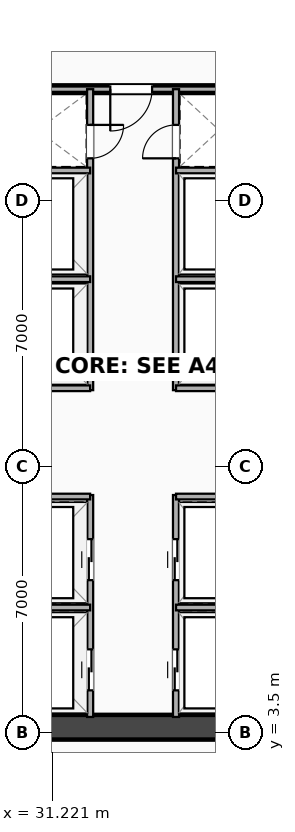
"""IFC4 building model, lengths in metres.
Left out: names, types, materials, properties, quantities, classifications, styles, units other than length and angle.
Written with IfcOpenShell. Run it as: python <this file> out.ifc"""

import sys

from ifc_helpers import new_model, si_unit, direction, frame, frame_2d, origin, place, context, subcontext, project, spatial, rectangle, extrude, element, fill, save


model = new_model("IFC4")
c1 = context("Model", 3, precision=1e-05, world=origin(), true_north=direction((0.0, 1.0)))
c2 = subcontext(c1, "Body", "Model", "MODEL_VIEW")
j1 = project(units=[si_unit("LENGTHUNIT", "METRE"), si_unit("PLANEANGLEUNIT", "RADIAN")], contexts=[c1])
p1 = place(None, origin())
s1 = spatial("IfcSite", under=j1, at=p1, CompositionType="ELEMENT")
p2 = place(p1, origin())
s2 = spatial("IfcBuilding", under=s1, at=p2, CompositionType="ELEMENT")
p3 = place(p2, frame((0.0, 0.0, 5.4)))
s3 = spatial("IfcBuildingStorey", under=s2, at=p3, CompositionType="ELEMENT", Elevation=5.4)
p4 = place(p3, frame((20.3, 3.63, 0.0), z_axis=(0.0, 0.0, 1.0), x_axis=(1.0, 0.0, 0.0)))
e1 = element("IfcWall", 1, at=p4, inside=s3, PredefinedType="SHEAR", context=c2, shape_type="SweptSolid", body=[
    extrude(rectangle(XDim=24.5, YDim=0.65, at=frame_2d((12.25, 0.0))), origin(), (0.0, 0.0, 1.0), 4.3),
])
p5 = place(p3, frame((29.2, 20.42, 0.0), z_axis=(0.0, 0.0, 1.0), x_axis=(1.0, 0.0, 0.0)))
e2 = element("IfcWall", 2, at=p5, inside=s3, PredefinedType="PARTITIONING", context=c2, shape_type="SweptSolid", body=[
    extrude(rectangle(XDim=7.8, YDim=0.2, at=frame_2d((3.9, 0.0))), origin(), (0.0, 0.0, 1.0), 2.635),
])
p6 = place(p5, frame((3.55, 0.0, 0.0)))
e3 = element("IfcOpeningElement", 3, at=p6, cuts=e2, PredefinedType="OPENING", context=c2, shape_type="SweptSolid", body=[
    extrude(rectangle(XDim=1.1, YDim=2.15, at=frame_2d((0.55, 1.075))), frame((0.0, 0.11, 0.0), z_axis=(0.0, -1.0, 0.0), x_axis=(1.0, 0.0, 0.0)), (0.0, 0.0, 1.0), 0.22),
])
p7 = place(p3, frame((32.22, 3.9, 0.0), z_axis=(0.0, 0.0, 1.0), x_axis=(0.0, 1.0, 0.0)))
e4 = element("IfcWall", 4, at=p7, inside=s3, PredefinedType="PARTITIONING", context=c2, shape_type="SweptSolid", body=[
    extrude(rectangle(XDim=5.84, YDim=0.16, at=frame_2d((2.92, 0.0))), origin(), (0.0, 0.0, 1.0), 3.373),
])
p8 = place(p7, frame((1.78, 0.0, 0.0), z_axis=(0.0, 0.0, 1.0), x_axis=(-1.0, 0.0, 0.0)))
e5 = element("IfcOpeningElement", 5, at=p8, cuts=e4, PredefinedType="OPENING", context=c2, shape_type="SweptSolid", body=[
    extrude(rectangle(XDim=1.08, YDim=2.16, at=frame_2d((0.54, 1.08))), frame((0.0, 0.09, 0.0), z_axis=(0.0, -1.0, 0.0), x_axis=(1.0, 0.0, 0.0)), (0.0, 0.0, 1.0), 0.18),
])
p9 = place(p7, frame((4.68, 0.0, 0.0), z_axis=(0.0, 0.0, 1.0), x_axis=(-1.0, 0.0, 0.0)))
e6 = element("IfcOpeningElement", 6, at=p9, cuts=e4, PredefinedType="OPENING", context=c2, shape_type="SweptSolid", body=[
    extrude(rectangle(XDim=1.08, YDim=2.16, at=frame_2d((0.54, 1.08))), frame((0.0, 0.09, 0.0), z_axis=(0.0, -1.0, 0.0), x_axis=(1.0, 0.0, 0.0)), (0.0, 0.0, 1.0), 0.18),
])
p10 = place(p3, frame((34.48, 3.9, 0.0), z_axis=(0.0, 0.0, 1.0), x_axis=(0.0, 1.0, 0.0)))
e7 = element("IfcWall", 7, at=p10, inside=s3, PredefinedType="PARTITIONING", context=c2, shape_type="SweptSolid", body=[
    extrude(rectangle(XDim=5.84, YDim=0.16, at=frame_2d((2.92, 0.0))), origin(), (0.0, 0.0, 1.0), 3.373),
])
p11 = place(p10, frame((0.7, 0.0, 0.0)))
e8 = element("IfcOpeningElement", 8, at=p11, cuts=e7, PredefinedType="OPENING", context=c2, shape_type="SweptSolid", body=[
    extrude(rectangle(XDim=1.08, YDim=2.16, at=frame_2d((0.54, 1.08))), frame((0.0, 0.09, 0.0), z_axis=(0.0, -1.0, 0.0), x_axis=(1.0, 0.0, 0.0)), (0.0, 0.0, 1.0), 0.18),
])
p12 = place(p10, frame((3.6, 0.0, 0.0)))
e9 = element("IfcOpeningElement", 9, at=p12, cuts=e7, PredefinedType="OPENING", context=c2, shape_type="SweptSolid", body=[
    extrude(rectangle(XDim=1.08, YDim=2.16, at=frame_2d((0.54, 1.08))), frame((0.0, 0.09, 0.0), z_axis=(0.0, -1.0, 0.0), x_axis=(1.0, 0.0, 0.0)), (0.0, 0.0, 1.0), 0.18),
])
p13 = place(p3, frame((29.45, 6.78, 0.0), z_axis=(0.0, 0.0, 1.0), x_axis=(1.0, 0.0, 0.0)))
e10 = element("IfcWall", 10, at=p13, inside=s3, PredefinedType="PARTITIONING", context=c2, shape_type="SweptSolid", body=[
    extrude(rectangle(XDim=2.77, YDim=0.15, at=frame_2d((1.385, 0.0))), origin(), (0.0, 0.0, 1.0), 3.43),
])
p14 = place(p3, frame((34.48, 6.78, 0.0), z_axis=(0.0, 0.0, 1.0), x_axis=(1.0, 0.0, 0.0)))
e11 = element("IfcWall", 11, at=p14, inside=s3, PredefinedType="PARTITIONING", context=c2, shape_type="SweptSolid", body=[
    extrude(rectangle(XDim=2.27, YDim=0.15, at=frame_2d((1.135, 0.0))), origin(), (0.0, 0.0, 1.0), 3.43),
])
p15 = place(p3, frame((29.45, 9.7, 0.0), z_axis=(0.0, 0.0, 1.0), x_axis=(1.0, 0.0, 0.0)))
e12 = element("IfcWall", 12, at=p15, inside=s3, PredefinedType="PARTITIONING", context=c2, shape_type="SweptSolid", body=[
    extrude(rectangle(XDim=2.77, YDim=0.15, at=frame_2d((1.385, 0.0))), origin(), (0.0, 0.0, 1.0), 3.43),
])
p16 = place(p3, frame((34.48, 9.7, 0.0), z_axis=(0.0, 0.0, 1.0), x_axis=(1.0, 0.0, 0.0)))
e13 = element("IfcWall", 13, at=p16, inside=s3, PredefinedType="PARTITIONING", context=c2, shape_type="SweptSolid", body=[
    extrude(rectangle(XDim=2.27, YDim=0.15, at=frame_2d((1.135, 0.0))), origin(), (0.0, 0.0, 1.0), 3.43),
])
p17 = place(p3, frame((32.22, 12.5, 0.0), z_axis=(0.0, 0.0, 1.0), x_axis=(0.0, 1.0, 0.0)))
e14 = element("IfcWall", 14, at=p17, inside=s3, PredefinedType="PARTITIONING", context=c2, shape_type="SweptSolid", body=[
    extrude(rectangle(XDim=7.92, YDim=0.16, at=frame_2d((3.96, 0.0))), origin(), (0.0, 0.0, 1.0), 3.373),
])
p18 = place(p17, frame((6.1, 0.0, 0.0)))
e15 = element("IfcOpeningElement", 15, at=p18, cuts=e14, PredefinedType="OPENING", context=c2, shape_type="SweptSolid", body=[
    extrude(rectangle(XDim=0.88, YDim=2.08, at=frame_2d((0.44, 1.04))), frame((0.0, 0.09, 0.0), z_axis=(0.0, -1.0, 0.0), x_axis=(1.0, 0.0, 0.0)), (0.0, 0.0, 1.0), 0.18),
])
p19 = place(p3, frame((34.48, 12.5, 0.0), z_axis=(0.0, 0.0, 1.0), x_axis=(0.0, 1.0, 0.0)))
e16 = element("IfcWall", 16, at=p19, inside=s3, PredefinedType="PARTITIONING", context=c2, shape_type="SweptSolid", body=[
    extrude(rectangle(XDim=7.92, YDim=0.16, at=frame_2d((3.96, 0.0))), origin(), (0.0, 0.0, 1.0), 3.373),
])
p20 = place(p19, frame((6.98, 0.0, 0.0), z_axis=(0.0, 0.0, 1.0), x_axis=(-1.0, 0.0, 0.0)))
e17 = element("IfcOpeningElement", 17, at=p20, cuts=e16, PredefinedType="OPENING", context=c2, shape_type="SweptSolid", body=[
    extrude(rectangle(XDim=0.88, YDim=2.08, at=frame_2d((0.44, 1.04))), frame((0.0, 0.09, 0.0), z_axis=(0.0, -1.0, 0.0), x_axis=(1.0, 0.0, 0.0)), (0.0, 0.0, 1.0), 0.18),
])
p21 = place(p3, frame((29.45, 12.55, 0.0), z_axis=(0.0, 0.0, 1.0), x_axis=(1.0, 0.0, 0.0)))
e18 = element("IfcWall", 18, at=p21, inside=s3, PredefinedType="PARTITIONING", context=c2, shape_type="SweptSolid", body=[
    extrude(rectangle(XDim=2.77, YDim=0.15, at=frame_2d((1.385, 0.0))), origin(), (0.0, 0.0, 1.0), 3.43),
])
p22 = place(p3, frame((34.48, 12.55, 0.0), z_axis=(0.0, 0.0, 1.0), x_axis=(1.0, 0.0, 0.0)))
e19 = element("IfcWall", 19, at=p22, inside=s3, PredefinedType="PARTITIONING", context=c2, shape_type="SweptSolid", body=[
    extrude(rectangle(XDim=2.27, YDim=0.15, at=frame_2d((1.135, 0.0))), origin(), (0.0, 0.0, 1.0), 3.43),
])
p23 = place(p3, frame((29.45, 15.42, 0.0), z_axis=(0.0, 0.0, 1.0), x_axis=(1.0, 0.0, 0.0)))
e20 = element("IfcWall", 20, at=p23, inside=s3, PredefinedType="PARTITIONING", context=c2, shape_type="SweptSolid", body=[
    extrude(rectangle(XDim=2.77, YDim=0.15, at=frame_2d((1.385, 0.0))), origin(), (0.0, 0.0, 1.0), 3.43),
])
p24 = place(p3, frame((34.48, 15.42, 0.0), z_axis=(0.0, 0.0, 1.0), x_axis=(1.0, 0.0, 0.0)))
e21 = element("IfcWall", 21, at=p24, inside=s3, PredefinedType="PARTITIONING", context=c2, shape_type="SweptSolid", body=[
    extrude(rectangle(XDim=2.27, YDim=0.15, at=frame_2d((1.135, 0.0))), origin(), (0.0, 0.0, 1.0), 3.43),
])
p25 = place(p3, frame((29.45, 18.28, 0.0), z_axis=(0.0, 0.0, 1.0), x_axis=(1.0, 0.0, 0.0)))
e22 = element("IfcWall", 22, at=p25, inside=s3, PredefinedType="PARTITIONING", context=c2, shape_type="SweptSolid", body=[
    extrude(rectangle(XDim=2.77, YDim=0.15, at=frame_2d((1.385, 0.0))), origin(), (0.0, 0.0, 1.0), 3.43),
])
p26 = place(p3, frame((34.48, 18.28, 0.0), z_axis=(0.0, 0.0, 1.0), x_axis=(1.0, 0.0, 0.0)))
e23 = element("IfcWall", 23, at=p26, inside=s3, PredefinedType="PARTITIONING", context=c2, shape_type="SweptSolid", body=[
    extrude(rectangle(XDim=2.27, YDim=0.15, at=frame_2d((1.135, 0.0))), origin(), (0.0, 0.0, 1.0), 3.43),
])
p27 = place(p6, origin())
e24 = element("IfcDoor", 24, at=p27, inside=s3, OperationType="SINGLE_SWING_LEFT", PredefinedType="DOOR", context=c2, shape_type="SweptSolid", body=[
    extrude(rectangle(XDim=1.1, YDim=2.15, at=frame_2d((0.55, 1.075))), frame((0.0, 0.025, 0.0), z_axis=(0.0, -1.0, 0.0), x_axis=(1.0, 0.0, 0.0)), (0.0, 0.0, 1.0), 0.05),
])
fill(e3, e24)
p28 = place(p8, origin())
e25 = element("IfcDoor", 25, at=p28, inside=s3, OperationType="DOUBLE_DOOR_SLIDING", PredefinedType="DOOR", context=c2, shape_type="SweptSolid", body=[
    extrude(rectangle(XDim=1.08, YDim=2.16, at=frame_2d((0.54, 1.08))), frame((0.0, 0.025, 0.0), z_axis=(0.0, -1.0, 0.0), x_axis=(1.0, 0.0, 0.0)), (0.0, 0.0, 1.0), 0.05),
])
fill(e5, e25)
p29 = place(p9, origin())
e26 = element("IfcDoor", 26, at=p29, inside=s3, OperationType="DOUBLE_DOOR_SLIDING", PredefinedType="DOOR", context=c2, shape_type="SweptSolid", body=[
    extrude(rectangle(XDim=1.08, YDim=2.16, at=frame_2d((0.54, 1.08))), frame((0.0, 0.025, 0.0), z_axis=(0.0, -1.0, 0.0), x_axis=(1.0, 0.0, 0.0)), (0.0, 0.0, 1.0), 0.05),
])
fill(e6, e26)
p30 = place(p11, origin())
e27 = element("IfcDoor", 27, at=p30, inside=s3, OperationType="DOUBLE_DOOR_SLIDING", PredefinedType="DOOR", context=c2, shape_type="SweptSolid", body=[
    extrude(rectangle(XDim=1.08, YDim=2.16, at=frame_2d((0.54, 1.08))), frame((0.0, 0.025, 0.0), z_axis=(0.0, -1.0, 0.0), x_axis=(1.0, 0.0, 0.0)), (0.0, 0.0, 1.0), 0.05),
])
fill(e8, e27)
p31 = place(p12, origin())
e28 = element("IfcDoor", 28, at=p31, inside=s3, OperationType="DOUBLE_DOOR_SLIDING", PredefinedType="DOOR", context=c2, shape_type="SweptSolid", body=[
    extrude(rectangle(XDim=1.08, YDim=2.16, at=frame_2d((0.54, 1.08))), frame((0.0, 0.025, 0.0), z_axis=(0.0, -1.0, 0.0), x_axis=(1.0, 0.0, 0.0)), (0.0, 0.0, 1.0), 0.05),
])
fill(e9, e28)
p32 = place(p18, origin())
e29 = element("IfcDoor", 29, at=p32, inside=s3, OperationType="SINGLE_SWING_RIGHT", PredefinedType="DOOR", context=c2, shape_type="SweptSolid", body=[
    extrude(rectangle(XDim=0.88, YDim=2.08, at=frame_2d((0.44, 1.04))), frame((0.0, 0.025, 0.0), z_axis=(0.0, -1.0, 0.0), x_axis=(1.0, 0.0, 0.0)), (0.0, 0.0, 1.0), 0.05),
])
fill(e15, e29)
p33 = place(p20, origin())
e30 = element("IfcDoor", 30, at=p33, inside=s3, OperationType="SINGLE_SWING_LEFT", PredefinedType="DOOR", context=c2, shape_type="SweptSolid", body=[
    extrude(rectangle(XDim=0.88, YDim=2.08, at=frame_2d((0.44, 1.04))), frame((0.0, 0.025, 0.0), z_axis=(0.0, -1.0, 0.0), x_axis=(1.0, 0.0, 0.0)), (0.0, 0.0, 1.0), 0.05),
])
fill(e17, e30)
save(model, sys.argv[1])
